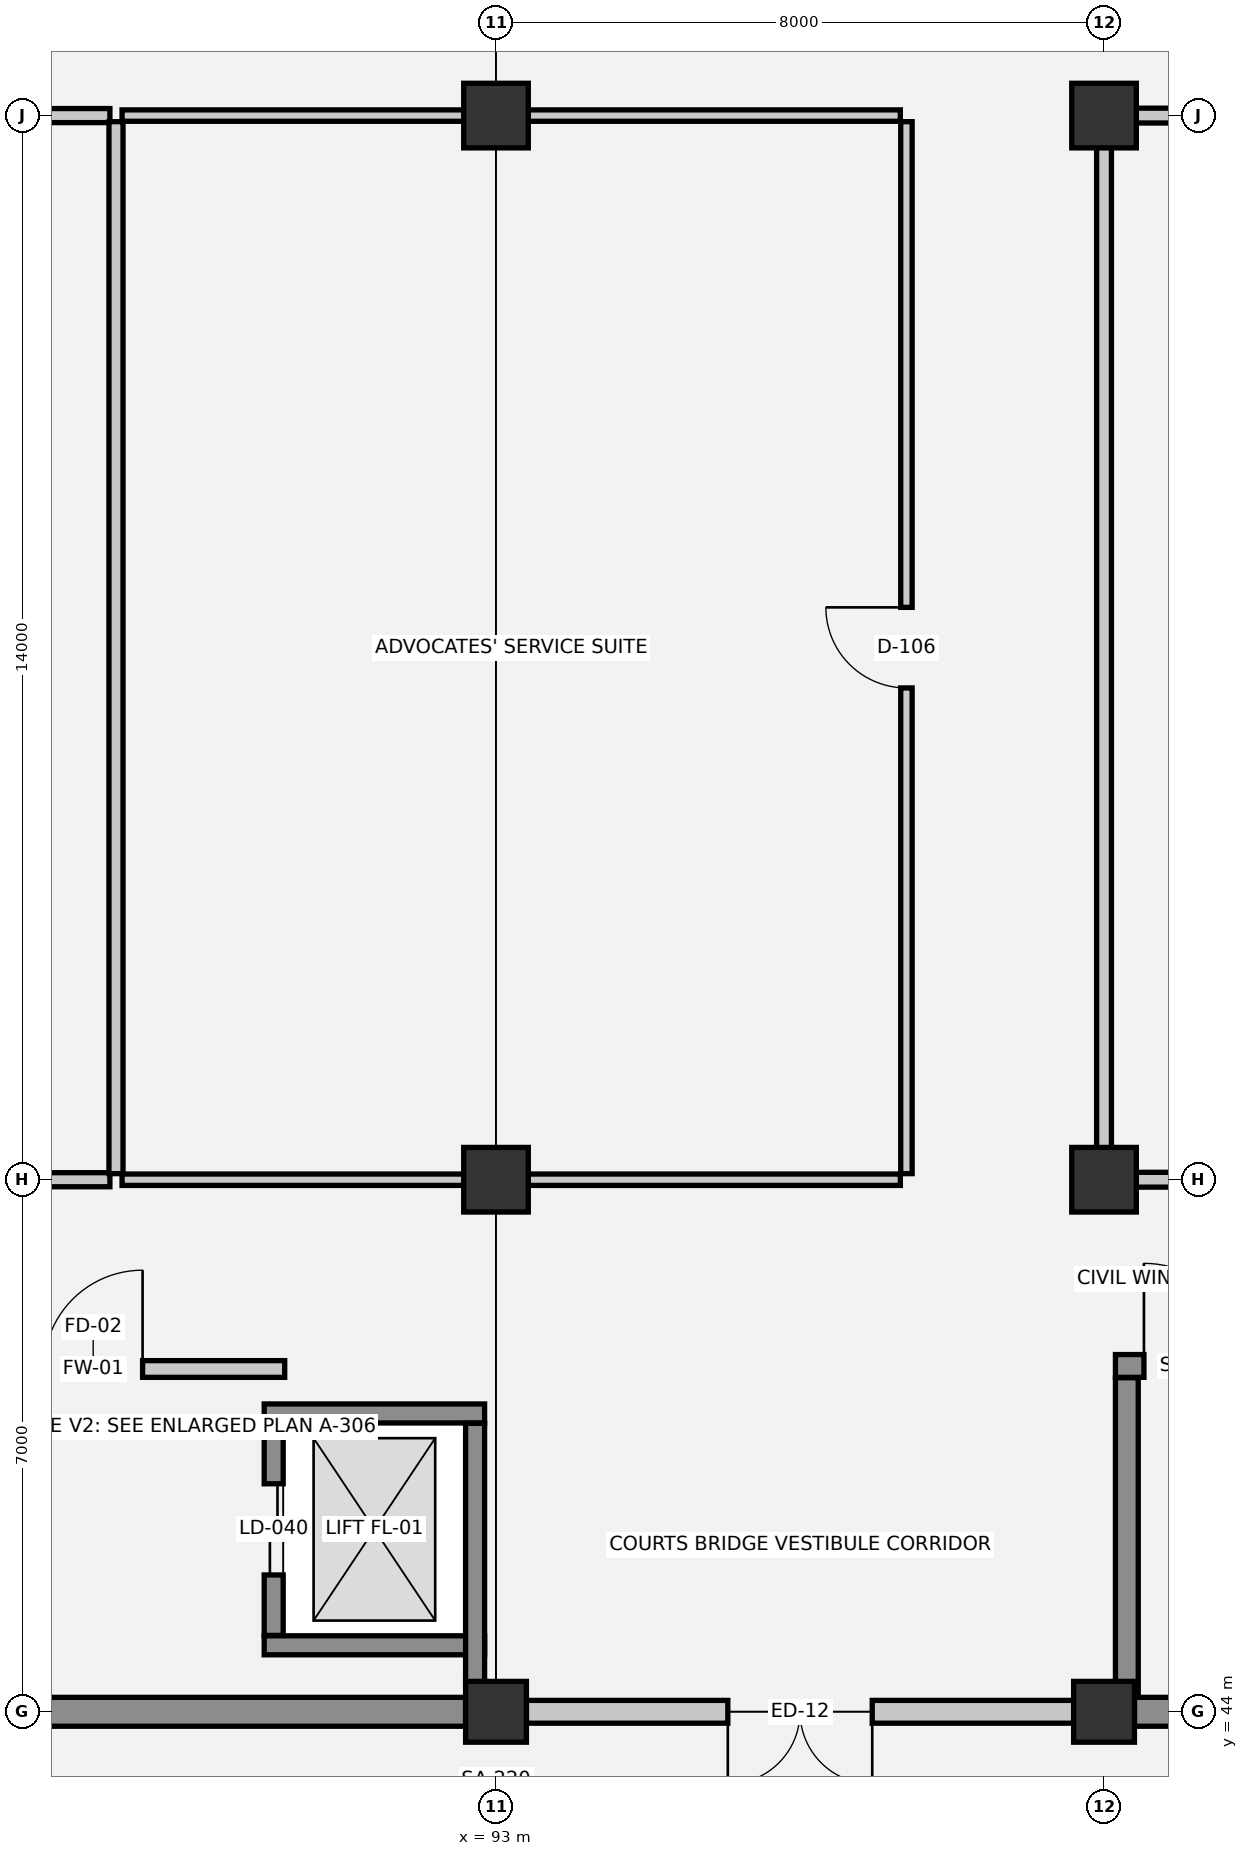
"""IFC4 building model, lengths in metres.
Left out: names, types, materials, properties, quantities, classifications, styles, units other than length and angle.
Written with IfcOpenShell. Run it as: python <this file> out.ifc"""

import sys

from ifc_helpers import new_model, si_unit, direction, frame, frame_2d, origin, origin_2d, place, context, subcontext, project, spatial, rectangle, extrude, element, fill, save


model = new_model("IFC4")
c1 = context("Model", 3, precision=1e-05, world=origin(), true_north=direction((0.0, 1.0)))
c2 = subcontext(c1, "Body", "Model", "MODEL_VIEW")
j1 = project(units=[si_unit("LENGTHUNIT", "METRE"), si_unit("PLANEANGLEUNIT", "RADIAN")], contexts=[c1])
p1 = place(None, origin())
s1 = spatial("IfcSite", under=j1, at=p1, CompositionType="ELEMENT")
p2 = place(p1, origin())
s2 = spatial("IfcBuilding", under=s1, at=p2, CompositionType="ELEMENT")
p3 = place(p2, origin())
s3 = spatial("IfcBuildingStorey", under=s2, at=p3, CompositionType="ELEMENT", Elevation=0.0)
p4 = place(p3, frame((93.0, 44.0, 0.0), z_axis=(0.0, 0.0, 1.0), x_axis=(1.0, 0.0, 0.0)))
e1 = element("IfcColumn", 1, at=p4, inside=s3, PredefinedType="COLUMN", context=c2, shape_type="SweptSolid", body=[
    extrude(rectangle(XDim=0.8, YDim=0.8, at=origin_2d()), origin(), (0.0, 0.0, 1.0), 5.4),
])
for number, where, z_axis, x_axis in (
    (2, (93.0, 51.0, 0.0), (0.0, 0.0, 1.0), (1.0, 0.0, 0.0)),
    (3, (93.0, 65.0, 0.0), (0.0, 0.0, 1.0), (1.0, 0.0, 0.0)),
):
    element("IfcColumn", number, at=place(p3, frame(where, z_axis=z_axis, x_axis=x_axis)), inside=s3, PredefinedType="COLUMN", context=c2, shape_type="SweptSolid", body=[
        extrude(rectangle(XDim=0.85, YDim=0.85, at=origin_2d()), origin(), (0.0, 0.0, 1.0), 5.4),
    ])
p5 = place(p3, frame((101.0, 44.0, 0.0), z_axis=(0.0, 0.0, 1.0), x_axis=(1.0, 0.0, 0.0)))
e4 = element("IfcColumn", 4, at=p5, inside=s3, PredefinedType="COLUMN", context=c2, shape_type="SweptSolid", body=[
    extrude(rectangle(XDim=0.8, YDim=0.8, at=origin_2d()), origin(), (0.0, 0.0, 1.0), 5.4),
])
for number, where, z_axis, x_axis in (
    (5, (101.0, 51.0, 0.0), (0.0, 0.0, 1.0), (1.0, 0.0, 0.0)),
    (6, (101.0, 65.0, 0.0), (0.0, 0.0, 1.0), (1.0, 0.0, 0.0)),
):
    element("IfcColumn", number, at=place(p3, frame(where, z_axis=z_axis, x_axis=x_axis)), inside=s3, PredefinedType="COLUMN", context=c2, shape_type="SweptSolid", body=[
        extrude(rectangle(XDim=0.85, YDim=0.85, at=origin_2d()), origin(), (0.0, 0.0, 1.0), 5.4),
    ])
p6 = place(p3, frame((108.6, 44.0, 0.0), z_axis=(0.0, 0.0, 1.0), x_axis=(-1.0, 0.0, 0.0)))
e7 = element("IfcWall", 7, at=p6, inside=s3, PredefinedType="STANDARD", context=c2, shape_type="SweptSolid", body=[
    extrude(rectangle(XDim=7.2, YDim=0.38, at=frame_2d((3.6, 0.0))), origin(), (0.0, 0.0, 1.0), 4.13),
])
p7 = place(p6, frame((3.1, 0.0, 0.95)))
e8 = element("IfcOpeningElement", 8, at=p7, cuts=e7, PredefinedType="OPENING", context=c2, shape_type="SweptSolid", body=[
    extrude(rectangle(XDim=1.0, YDim=1.5, at=frame_2d((0.5, 0.75))), frame((0.0, 0.2, 0.0), z_axis=(0.0, -1.0, 0.0), x_axis=(1.0, 0.0, 0.0)), (0.0, 0.0, 1.0), 0.4),
])
p8 = place(p3, frame((100.6, 44.0, 0.0), z_axis=(0.0, 0.0, 1.0), x_axis=(-1.0, 0.0, 0.0)))
e9 = element("IfcWall", 9, at=p8, inside=s3, PredefinedType="SOLIDWALL", context=c2, shape_type="SweptSolid", body=[
    extrude(rectangle(XDim=7.2, YDim=0.3, at=frame_2d((3.6, 0.0))), origin(), (0.0, 0.0, 1.0), 4.13),
])
p9 = place(p8, frame((2.65, 0.0, 0.0)))
e10 = element("IfcOpeningElement", 10, at=p9, cuts=e9, PredefinedType="OPENING", context=c2, shape_type="SweptSolid", body=[
    extrude(rectangle(XDim=1.9, YDim=2.25, at=frame_2d((0.95, 1.125))), frame((0.0, 0.16, 0.0), z_axis=(0.0, -1.0, 0.0), x_axis=(1.0, 0.0, 0.0)), (0.0, 0.0, 1.0), 0.32),
])
p10 = place(p3, frame((92.6, 44.0, 0.0), z_axis=(0.0, 0.0, 1.0), x_axis=(-1.0, 0.0, 0.0)))
e11 = element("IfcWall", 11, at=p10, inside=s3, PredefinedType="STANDARD", context=c2, shape_type="SweptSolid", body=[
    extrude(rectangle(XDim=7.2, YDim=0.38, at=frame_2d((3.6, 0.0))), origin(), (0.0, 0.0, 1.0), 4.13),
])
for number, where, z_axis, x_axis in (
    (12, (89.95, 44.875, 0.0), (0.0, 0.0, 1.0), (1.0, 0.0, 0.0)),
    (13, (92.85, 47.925, 0.0), (0.0, 0.0, 1.0), (-1.0, 0.0, 0.0)),
):
    element("IfcWall", number, at=place(p3, frame(where, z_axis=z_axis, x_axis=x_axis)), inside=s3, PredefinedType="SHEAR", context=c2, shape_type="SweptSolid", body=[
        extrude(rectangle(XDim=2.9, YDim=0.25, at=frame_2d((1.45, 0.0))), origin(), (0.0, 0.0, 1.0), 5.4),
    ])
p11 = place(p3, frame((90.075, 47.795, 0.0), z_axis=(0.0, 0.0, 1.0), x_axis=(0.0, -1.0, 0.0)))
e14 = element("IfcWall", 14, at=p11, inside=s3, PredefinedType="SHEAR", context=c2, shape_type="SweptSolid", body=[
    extrude(rectangle(XDim=2.79, YDim=0.25, at=frame_2d((1.395, 0.0))), origin(), (0.0, 0.0, 1.0), 5.4),
])
p12 = place(p11, frame((0.795, 0.0, 0.0)))
e15 = element("IfcOpeningElement", 15, at=p12, cuts=e14, PredefinedType="OPENING", context=c2, shape_type="SweptSolid", body=[
    extrude(rectangle(XDim=1.2, YDim=2.2, at=frame_2d((0.6, 1.1))), frame((0.0, 0.135, 0.0), z_axis=(0.0, -1.0, 0.0), x_axis=(1.0, 0.0, 0.0)), (0.0, 0.0, 1.0), 0.27),
])
p13 = place(p3, frame((92.725, 44.38, 0.0), z_axis=(0.0, 0.0, 1.0), x_axis=(0.0, 1.0, 0.0)))
e16 = element("IfcWall", 16, at=p13, inside=s3, PredefinedType="SHEAR", context=c2, shape_type="SweptSolid", body=[
    extrude(rectangle(XDim=3.415, YDim=0.25, at=frame_2d((1.708, 0.0))), origin(), (0.0, 0.0, 1.0), 5.4),
])
p14 = place(p3, frame((101.15, 48.55, 0.0), z_axis=(0.0, 0.0, 1.0), x_axis=(1.0, 0.0, 0.0)))
e17 = element("IfcWall", 17, at=p14, inside=s3, PredefinedType="SHEAR", context=c2, shape_type="SweptSolid", body=[
    extrude(rectangle(XDim=7.7, YDim=0.3, at=frame_2d((3.85, 0.0))), origin(), (0.0, 0.0, 1.0), 5.1),
])
p15 = place(p14, frame((0.375, 0.0, 0.0)))
e18 = element("IfcOpeningElement", 18, at=p15, cuts=e17, PredefinedType="OPENING", context=c2, shape_type="SweptSolid", body=[
    extrude(rectangle(XDim=1.35, YDim=2.2, at=frame_2d((0.675, 1.1))), frame((0.0, 0.16, 0.0), z_axis=(0.0, -1.0, 0.0), x_axis=(1.0, 0.0, 0.0)), (0.0, 0.0, 1.0), 0.32),
])
p16 = place(p3, frame((101.3, 48.395, 0.0), z_axis=(0.0, 0.0, 1.0), x_axis=(0.0, -1.0, 0.0)))
e19 = element("IfcWall", 19, at=p16, inside=s3, PredefinedType="SHEAR", context=c2, shape_type="SweptSolid", body=[
    extrude(rectangle(XDim=4.2, YDim=0.3, at=frame_2d((2.1, 0.0))), origin(), (0.0, 0.0, 1.0), 5.1),
])
p17 = place(p3, frame((85.18, 48.51, 0.0), z_axis=(0.0, 0.0, 1.0), x_axis=(1.0, 0.0, 0.0)))
e20 = element("IfcWall", 20, at=p17, inside=s3, PredefinedType="SOLIDWALL", context=c2, shape_type="SweptSolid", body=[
    extrude(rectangle(XDim=5.04, YDim=0.22, at=frame_2d((2.52, 0.0))), origin(), (0.0, 0.0, 1.0), 5.1),
])
p18 = place(p17, frame((1.87, 0.0, 0.0)))
e21 = element("IfcOpeningElement", 21, at=p18, cuts=e20, PredefinedType="OPENING", context=c2, shape_type="SweptSolid", body=[
    extrude(rectangle(XDim=1.3, YDim=2.15, at=frame_2d((0.65, 1.075))), frame((0.0, 0.12, 0.0), z_axis=(0.0, -1.0, 0.0), x_axis=(1.0, 0.0, 0.0)), (0.0, 0.0, 1.0), 0.24),
])
p19 = place(p3, frame((82.4, 51.0, 0.0), z_axis=(0.0, 0.0, 1.0), x_axis=(1.0, 0.0, 0.0)))
e22 = element("IfcWall", 22, at=p19, inside=s3, PredefinedType="PARTITIONING", context=c2, shape_type="SweptSolid", body=[
    extrude(rectangle(XDim=5.52, YDim=0.185, at=frame_2d((2.76, 0.0))), origin(), (0.0, 0.0, 1.0), 4.3),
])
p20 = place(p3, frame((88.08, 51.0, 0.0), z_axis=(0.0, 0.0, 1.0), x_axis=(1.0, 0.0, 0.0)))
e23 = element("IfcWall", 23, at=p20, inside=s3, PredefinedType="PARTITIONING", context=c2, shape_type="SweptSolid", body=[
    extrude(rectangle(XDim=10.24, YDim=0.15, at=frame_2d((5.12, 0.0))), origin(), (0.0, 0.0, 1.0), 4.3),
])
p21 = place(p3, frame((101.08, 51.0, 0.0), z_axis=(0.0, 0.0, 1.0), x_axis=(1.0, 0.0, 0.0)))
e24 = element("IfcWall", 24, at=p21, inside=s3, PredefinedType="PARTITIONING", context=c2, shape_type="SweptSolid", body=[
    extrude(rectangle(XDim=22.84, YDim=0.195, at=frame_2d((11.42, 0.0))), origin(), (0.0, 0.0, 1.0), 4.3),
])
p22 = place(p21, frame((10.52, 0.0, 0.0)))
e25 = element("IfcOpeningElement", 25, at=p22, cuts=e24, PredefinedType="OPENING", context=c2, shape_type="SweptSolid", body=[
    extrude(rectangle(XDim=1.8, YDim=2.3, at=frame_2d((0.9, 1.15))), frame((0.0, 0.107, 0.0), z_axis=(0.0, -1.0, 0.0), x_axis=(1.0, 0.0, 0.0)), (0.0, 0.0, 1.0), 0.215),
])
p23 = place(p3, frame((75.6, 65.0, 0.0), z_axis=(0.0, 0.0, 1.0), x_axis=(1.0, 0.0, 0.0)))
e26 = element("IfcWall", 26, at=p23, inside=s3, PredefinedType="PARTITIONING", context=c2, shape_type="SweptSolid", body=[
    extrude(rectangle(XDim=12.32, YDim=0.185, at=frame_2d((6.16, 0.0))), origin(), (0.0, 0.0, 1.0), 4.3),
])
p24 = place(p23, frame((5.26, 0.0, 0.0)))
e27 = element("IfcOpeningElement", 27, at=p24, cuts=e26, PredefinedType="OPENING", context=c2, shape_type="SweptSolid", body=[
    extrude(rectangle(XDim=1.8, YDim=2.3, at=frame_2d((0.9, 1.15))), frame((0.0, 0.103, 0.0), z_axis=(0.0, -1.0, 0.0), x_axis=(1.0, 0.0, 0.0)), (0.0, 0.0, 1.0), 0.205),
])
p25 = place(p3, frame((88.08, 65.0, 0.0), z_axis=(0.0, 0.0, 1.0), x_axis=(1.0, 0.0, 0.0)))
e28 = element("IfcWall", 28, at=p25, inside=s3, PredefinedType="PARTITIONING", context=c2, shape_type="SweptSolid", body=[
    extrude(rectangle(XDim=10.24, YDim=0.15, at=frame_2d((5.12, 0.0))), origin(), (0.0, 0.0, 1.0), 4.3),
])
p26 = place(p3, frame((101.08, 65.0, 0.0), z_axis=(0.0, 0.0, 1.0), x_axis=(1.0, 0.0, 0.0)))
e29 = element("IfcWall", 29, at=p26, inside=s3, PredefinedType="PARTITIONING", context=c2, shape_type="SweptSolid", body=[
    extrude(rectangle(XDim=22.84, YDim=0.195, at=frame_2d((11.42, 0.0))), origin(), (0.0, 0.0, 1.0), 4.3),
])
p27 = place(p3, frame((88.0, 51.08, 0.0), z_axis=(0.0, 0.0, 1.0), x_axis=(0.0, 1.0, 0.0)))
e30 = element("IfcWall", 30, at=p27, inside=s3, PredefinedType="PARTITIONING", context=c2, shape_type="SweptSolid", body=[
    extrude(rectangle(XDim=13.84, YDim=0.185, at=frame_2d((6.92, 0.0))), origin(), (0.0, 0.0, 1.0), 5.04),
])
p28 = place(p3, frame((98.4, 51.08, 0.0), z_axis=(0.0, 0.0, 1.0), x_axis=(0.0, 1.0, 0.0)))
e31 = element("IfcWall", 31, at=p28, inside=s3, PredefinedType="PARTITIONING", context=c2, shape_type="SweptSolid", body=[
    extrude(rectangle(XDim=13.84, YDim=0.15, at=frame_2d((6.92, 0.0))), origin(), (0.0, 0.0, 1.0), 5.04),
])
p29 = place(p28, frame((6.39, 0.0, 0.0)))
e32 = element("IfcOpeningElement", 32, at=p29, cuts=e31, PredefinedType="OPENING", context=c2, shape_type="SweptSolid", body=[
    extrude(rectangle(XDim=1.06, YDim=2.2, at=frame_2d((0.53, 1.1))), frame((0.0, 0.085, 0.0), z_axis=(0.0, -1.0, 0.0), x_axis=(1.0, 0.0, 0.0)), (0.0, 0.0, 1.0), 0.17),
])
p30 = place(p3, frame((101.0, 51.08, 0.0), z_axis=(0.0, 0.0, 1.0), x_axis=(0.0, 1.0, 0.0)))
e33 = element("IfcWall", 33, at=p30, inside=s3, PredefinedType="PARTITIONING", context=c2, shape_type="SweptSolid", body=[
    extrude(rectangle(XDim=13.84, YDim=0.195, at=frame_2d((6.92, 0.0))), origin(), (0.0, 0.0, 1.0), 4.15),
])
p31 = place(p9, origin())
e34 = element("IfcDoor", 34, at=p31, inside=s3, OperationType="DOUBLE_DOOR_SINGLE_SWING", PredefinedType="DOOR", context=c2, shape_type="SweptSolid", body=[
    extrude(rectangle(XDim=1.9, YDim=2.25, at=frame_2d((0.95, 1.125))), frame((0.0, 0.025, 0.0), z_axis=(0.0, -1.0, 0.0), x_axis=(1.0, 0.0, 0.0)), (0.0, 0.0, 1.0), 0.05),
])
fill(e10, e34)
p32 = place(p12, origin())
e35 = element("IfcDoor", 35, at=p32, inside=s3, OperationType="DOUBLE_DOOR_SLIDING", PredefinedType="DOOR", context=c2, shape_type="SweptSolid", body=[
    extrude(rectangle(XDim=1.2, YDim=2.2, at=frame_2d((0.6, 1.1))), frame((0.0, 0.025, 0.0), z_axis=(0.0, -1.0, 0.0), x_axis=(1.0, 0.0, 0.0)), (0.0, 0.0, 1.0), 0.05),
])
fill(e15, e35)
p33 = place(p15, origin())
e36 = element("IfcDoor", 36, at=p33, inside=s3, OperationType="SINGLE_SWING_LEFT", PredefinedType="DOOR", context=c2, shape_type="SweptSolid", body=[
    extrude(rectangle(XDim=1.35, YDim=2.2, at=frame_2d((0.675, 1.1))), frame((0.0, 0.025, 0.0), z_axis=(0.0, -1.0, 0.0), x_axis=(1.0, 0.0, 0.0)), (0.0, 0.0, 1.0), 0.05),
])
fill(e18, e36)
p34 = place(p18, origin())
e37 = element("IfcDoor", 37, at=p34, inside=s3, OperationType="SINGLE_SWING_RIGHT", PredefinedType="DOOR", context=c2, shape_type="SweptSolid", body=[
    extrude(rectangle(XDim=1.3, YDim=2.15, at=frame_2d((0.65, 1.075))), frame((0.0, 0.025, 0.0), z_axis=(0.0, -1.0, 0.0), x_axis=(1.0, 0.0, 0.0)), (0.0, 0.0, 1.0), 0.05),
])
fill(e21, e37)
p35 = place(p29, origin())
e38 = element("IfcDoor", 38, at=p35, inside=s3, OperationType="SINGLE_SWING_RIGHT", PredefinedType="DOOR", context=c2, shape_type="SweptSolid", body=[
    extrude(rectangle(XDim=1.06, YDim=2.2, at=frame_2d((0.53, 1.1))), frame((0.0, 0.025, 0.0), z_axis=(0.0, -1.0, 0.0), x_axis=(1.0, 0.0, 0.0)), (0.0, 0.0, 1.0), 0.05),
])
fill(e32, e38)
save(model, sys.argv[1])
